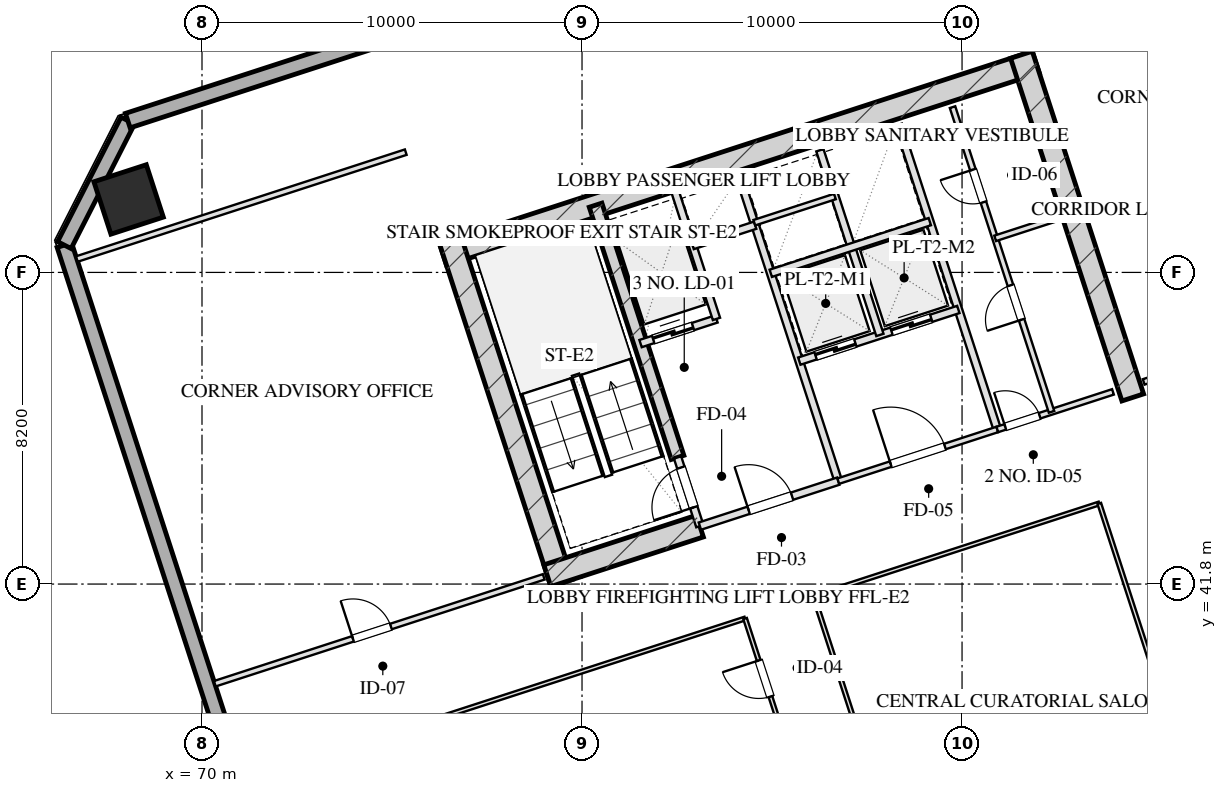
"""IFC4 building model, lengths in metres.
Left out: names, types, materials, properties, quantities, classifications, styles, units other than length and angle.
Written with IfcOpenShell. Run it as: python <this file> out.ifc"""

import sys

from ifc_helpers import new_model, si_unit, direction, frame, frame_2d, origin, origin_2d, place, context, subcontext, project, spatial, rectangle, hollow_rectangle, extrude, element, fill, save


model = new_model("IFC4")
c1 = context("Model", 3, precision=1e-05, world=origin(), true_north=direction((0.0, 1.0)))
c2 = subcontext(c1, "Body", "Model", "MODEL_VIEW")
j1 = project(units=[si_unit("LENGTHUNIT", "METRE"), si_unit("PLANEANGLEUNIT", "RADIAN")], contexts=[c1])
p1 = place(None, origin())
s1 = spatial("IfcSite", under=j1, at=p1, CompositionType="ELEMENT")
p2 = place(p1, origin())
s2 = spatial("IfcBuilding", under=s1, at=p2, CompositionType="ELEMENT")
p3 = place(p2, frame((0.0, 0.0, 113.85)))
s3 = spatial("IfcBuildingStorey", under=s2, at=p3, CompositionType="ELEMENT", Elevation=113.85)
p4 = place(p3, frame((76.344, 50.466, 0.0), z_axis=(0.0, 0.0, 1.0), x_axis=(0.951055727519, 0.309019421968, 0.0)))
e1 = element("IfcWall", 1, at=p4, inside=s3, PredefinedType="SHEAR", context=c2, shape_type="SweptSolid", body=[
    extrude(rectangle(XDim=16.4, YDim=0.6, at=frame_2d((8.2, 0.0))), origin(), (0.0, 0.0, 1.0), 3.45),
])
for number, where, z_axis, x_axis in (
    (2, (79.466, 41.828, 0.0), (0.0, 0.0, 1.0), (-0.309, 0.951, 0.0)),
    (3, (94.492, 46.71, 0.0), (0.0, 0.0, 1.0), (-0.309, 0.951, 0.0)),
):
    element("IfcWall", number, at=place(p3, frame(where, z_axis=z_axis, x_axis=x_axis)), inside=s3, PredefinedType="SHEAR", context=c2, shape_type="SweptSolid", body=[
        extrude(rectangle(XDim=9.48, YDim=0.6, at=frame_2d((4.74, 0.0))), origin(), (0.0, 0.0, 1.0), 3.45),
    ])
p5 = place(p3, frame((82.514, 45.131, 0.0), z_axis=(0.0, 0.0, 1.0), x_axis=(-0.308988790936, 0.951065679686, 0.0)))
e4 = element("IfcWall", 4, at=p5, inside=s3, PredefinedType="SHEAR", context=c2, shape_type="SweptSolid", body=[
    extrude(rectangle(XDim=6.98, YDim=0.35, at=frame_2d((3.49, 0.0))), origin(), (0.0, 0.0, 1.0), 3.45),
])
p6 = place(p3, frame((79.087, 42.021, 0.0), z_axis=(0.0, 0.0, 1.0), x_axis=(0.951062550203, 0.3089984233, 0.0)))
e5 = element("IfcWall", 5, at=p6, inside=s3, PredefinedType="SHEAR", context=c2, shape_type="SweptSolid", body=[
    extrude(rectangle(XDim=4.22, YDim=0.6, at=frame_2d((2.11, 0.0))), origin(), (0.0, 0.0, 1.0), 3.45),
])
p7 = place(p3, frame((68.069, 51.92, 0.0), z_axis=(0.0, 0.0, 1.0), x_axis=(0.951056516295, 0.309016994375, 0.0)))
e6 = element("IfcColumn", 6, at=p7, inside=s3, PredefinedType="COLUMN", context=c2, shape_type="SweptSolid", body=[
    extrude(hollow_rectangle(XDim=1.45, YDim=1.45, WallThickness=0.05, at=origin_2d()), origin(), (0.0, 0.0, 1.0), 3.451),
])
p8 = place(p3, frame((80.716, 6.59, 0.0), z_axis=(0.0, 0.0, 1.0), x_axis=(-0.309017542002, 0.95105633836, 0.0)))
e7 = element("IfcWall", 7, at=p8, inside=s3, PredefinedType="SOLIDWALL", context=c2, shape_type="SweptSolid", body=[
    extrude(rectangle(XDim=46.4, YDim=0.4, at=frame_2d((23.2, 0.0))), origin(), (0.0, 0.0, 1.0), 2.61),
])
p9 = place(p8, frame((25.25, 0.0, 0.0)))
e8 = element("IfcOpeningElement", 8, at=p9, cuts=e7, PredefinedType="OPENING", context=c2, shape_type="SweptSolid", body=[
    extrude(rectangle(XDim=1.1, YDim=2.15, at=frame_2d((0.55, 1.075))), frame((0.0, 0.21, 0.0), z_axis=(0.0, -1.0, 0.0), x_axis=(1.0, 0.0, 0.0)), (0.0, 0.0, 1.0), 0.42),
])
p10 = place(p3, frame((66.377, 50.719, 0.0), z_axis=(0.0, 0.0, 1.0), x_axis=(0.454026238093, 0.890988313685, 0.0)))
e9 = element("IfcWall", 9, at=p10, inside=s3, PredefinedType="SOLIDWALL", context=c2, shape_type="SweptSolid", body=[
    extrude(rectangle(XDim=3.677, YDim=0.4, at=frame_2d((1.838, 0.0))), origin(), (0.0, 0.0, 1.0), 2.61),
])
p11 = place(p3, frame((68.047, 53.995, 0.0), z_axis=(0.0, 0.0, 1.0), x_axis=(0.95105505922, 0.309021478754, 0.0)))
e10 = element("IfcWall", 10, at=p11, inside=s3, PredefinedType="SOLIDWALL", context=c2, shape_type="SweptSolid", body=[
    extrude(rectangle(XDim=29.4, YDim=0.4, at=frame_2d((14.7, 0.0))), origin(), (0.0, 0.0, 1.0), 2.61),
])
p12 = place(p3, frame((83.101, 43.324, 0.0), z_axis=(0.0, 0.0, 1.0), x_axis=(-0.309048298632, 0.951046344356, 0.0)))
e11 = element("IfcWall", 11, at=p12, inside=s3, PredefinedType="PARTITIONING", context=c2, shape_type="SweptSolid", body=[
    extrude(rectangle(XDim=1.9, YDim=0.2, at=frame_2d((0.95, 0.0))), origin(), (0.0, 0.0, 1.0), 3.175),
])
p13 = place(p12, frame((0.52, 0.0, 0.0)))
e12 = element("IfcOpeningElement", 12, at=p13, cuts=e11, PredefinedType="OPENING", context=c2, shape_type="SweptSolid", body=[
    extrude(rectangle(XDim=1.1, YDim=2.05, at=frame_2d((0.55, 1.025))), frame((0.0, 0.11, 0.0), z_axis=(0.0, -1.0, 0.0), x_axis=(1.0, 0.0, 0.0)), (0.0, 0.0, 1.0), 0.22),
])
p14 = place(p3, frame((86.743, 44.508, 0.0), z_axis=(0.0, 0.0, 1.0), x_axis=(-0.309016001439, 0.951056838919, 0.0)))
e13 = element("IfcWall", 13, at=p14, inside=s3, PredefinedType="PARTITIONING", context=c2, shape_type="SweptSolid", body=[
    extrude(rectangle(XDim=8.43, YDim=0.2, at=frame_2d((4.215, 0.0))), origin(), (0.0, 0.0, 1.0), 3.175),
])
p15 = place(p3, frame((83.101, 43.324, 0.0), z_axis=(0.0, 0.0, 1.0), x_axis=(0.951052804469, 0.309028417967, 0.0)))
e14 = element("IfcWall", 14, at=p15, inside=s3, PredefinedType="PARTITIONING", context=c2, shape_type="SweptSolid", body=[
    extrude(rectangle(XDim=3.83, YDim=0.2, at=frame_2d((1.915, 0.0))), origin(), (0.0, 0.0, 1.0), 3.175),
])
p16 = place(p15, frame((1.35, 0.0, 0.0)))
e15 = element("IfcOpeningElement", 15, at=p16, cuts=e14, PredefinedType="OPENING", context=c2, shape_type="SweptSolid", body=[
    extrude(rectangle(XDim=1.2, YDim=2.05, at=frame_2d((0.6, 1.025))), frame((0.0, 0.11, 0.0), z_axis=(0.0, -1.0, 0.0), x_axis=(1.0, 0.0, 0.0)), (0.0, 0.0, 1.0), 0.22),
])
p17 = place(p3, frame((81.54, 48.127, 0.0), z_axis=(0.0, 0.0, 1.0), x_axis=(0.951062257173, 0.308999325213, 0.0)))
e16 = element("IfcWall", 16, at=p17, inside=s3, PredefinedType="PARTITIONING", context=c2, shape_type="SweptSolid", body=[
    extrude(rectangle(XDim=2.1, YDim=0.2, at=frame_2d((1.05, 0.0))), origin(), (0.0, 0.0, 1.0), 3.175),
])
p18 = place(p17, frame((0.35, 0.0, 0.0)))
e17 = element("IfcOpeningElement", 17, at=p18, cuts=e16, PredefinedType="OPENING", context=c2, shape_type="SweptSolid", body=[
    extrude(rectangle(XDim=1.1, YDim=2.05, at=frame_2d((0.55, 1.025))), frame((0.0, 0.11, 0.0), z_axis=(0.0, -1.0, 0.0), x_axis=(1.0, 0.0, 0.0)), (0.0, 0.0, 1.0), 0.22),
])
p19 = place(p3, frame((83.538, 48.776, 0.0), z_axis=(0.0, 0.0, 1.0), x_axis=(-0.3089935693, 0.951064127245, 0.0)))
e18 = element("IfcWall", 18, at=p19, inside=s3, PredefinedType="PARTITIONING", context=c2, shape_type="SweptSolid", body=[
    extrude(rectangle(XDim=3.7, YDim=0.2, at=frame_2d((1.85, 0.0))), origin(), (0.0, 0.0, 1.0), 3.175),
])
p20 = place(p3, frame((82.91, 50.707, 0.0), z_axis=(0.0, 0.0, 1.0), x_axis=(0.951041328149, 0.309063734775, 0.0)))
e19 = element("IfcWall", 19, at=p20, inside=s3, PredefinedType="PARTITIONING", context=c2, shape_type="SweptSolid", body=[
    extrude(rectangle(XDim=1.73, YDim=0.2, at=frame_2d((0.865, 0.0))), origin(), (0.0, 0.0, 1.0), 3.175),
])
p21 = place(p3, frame((90.928, 45.868, 0.0), z_axis=(0.0, 0.0, 1.0), x_axis=(-0.309042196757, 0.951048327176, 0.0)))
e20 = element("IfcWall", 20, at=p21, inside=s3, PredefinedType="PARTITIONING", context=c2, shape_type="SweptSolid", body=[
    extrude(rectangle(XDim=8.43, YDim=0.2, at=frame_2d((4.215, 0.0))), origin(), (0.0, 0.0, 1.0), 3.175),
])
p22 = place(p3, frame((86.743, 44.508, 0.0), z_axis=(0.0, 0.0, 1.0), x_axis=(0.951063829732, 0.308994485023, 0.0)))
e21 = element("IfcWall", 21, at=p22, inside=s3, PredefinedType="PARTITIONING", context=c2, shape_type="SweptSolid", body=[
    extrude(rectangle(XDim=4.4, YDim=0.15, at=frame_2d((2.2, 0.0))), origin(), (0.0, 0.0, 1.0), 3.175),
])
p23 = place(p22, frame((1.45, 0.0, 0.0)))
e22 = element("IfcOpeningElement", 22, at=p23, cuts=e21, PredefinedType="OPENING", context=c2, shape_type="SweptSolid", body=[
    extrude(rectangle(XDim=1.5, YDim=2.05, at=frame_2d((0.75, 1.025))), frame((0.0, 0.085, 0.0), z_axis=(0.0, -1.0, 0.0), x_axis=(1.0, 0.0, 0.0)), (0.0, 0.0, 1.0), 0.17),
])
p24 = place(p3, frame((85.718, 47.666, 0.0), z_axis=(0.0, 0.0, 1.0), x_axis=(0.951058531764, 0.30901079133, 0.0)))
e23 = element("IfcWall", 23, at=p24, inside=s3, PredefinedType="PARTITIONING", context=c2, shape_type="SweptSolid", body=[
    extrude(rectangle(XDim=4.4, YDim=0.2, at=frame_2d((2.2, 0.0))), origin(), (0.0, 0.0, 1.0), 3.175),
])
p25 = place(p24, frame((0.45, 0.0, 0.0)))
e24 = element("IfcOpeningElement", 24, at=p25, cuts=e23, PredefinedType="OPENING", context=c2, shape_type="SweptSolid", body=[
    extrude(rectangle(XDim=1.1, YDim=2.05, at=frame_2d((0.55, 1.025))), frame((0.0, 0.11, 0.0), z_axis=(0.0, -1.0, 0.0), x_axis=(1.0, 0.0, 0.0)), (0.0, 0.0, 1.0), 0.22),
])
p26 = place(p24, frame((2.55, 0.0, 0.0)))
e25 = element("IfcOpeningElement", 25, at=p26, cuts=e23, PredefinedType="OPENING", context=c2, shape_type="SweptSolid", body=[
    extrude(rectangle(XDim=1.1, YDim=2.05, at=frame_2d((0.55, 1.025))), frame((0.0, 0.11, 0.0), z_axis=(0.0, -1.0, 0.0), x_axis=(1.0, 0.0, 0.0)), (0.0, 0.0, 1.0), 0.22),
])
p27 = place(p3, frame((87.838, 48.354, 0.0), z_axis=(0.0, 0.0, 1.0), x_axis=(-0.3090093719, 0.951058992953, 0.0)))
e26 = element("IfcWall", 26, at=p27, inside=s3, PredefinedType="PARTITIONING", context=c2, shape_type="SweptSolid", body=[
    extrude(rectangle(XDim=5.11, YDim=0.2, at=frame_2d((2.555, 0.0))), origin(), (0.0, 0.0, 1.0), 3.175),
])
p28 = place(p3, frame((84.967, 49.977, 0.0), z_axis=(0.0, 0.0, 1.0), x_axis=(0.951063829732, 0.308994485023, 0.0)))
e27 = element("IfcWall", 27, at=p28, inside=s3, PredefinedType="PARTITIONING", context=c2, shape_type="SweptSolid", body=[
    extrude(rectangle(XDim=4.4, YDim=0.2, at=frame_2d((2.2, 0.0))), origin(), (0.0, 0.0, 1.0), 3.175),
])
p29 = place(p3, frame((84.534, 51.308, 0.0), z_axis=(0.0, 0.0, 1.0), x_axis=(0.951075093106, 0.308959814982, 0.0)))
e28 = element("IfcWall", 28, at=p29, inside=s3, PredefinedType="PARTITIONING", context=c2, shape_type="SweptSolid", body=[
    extrude(rectangle(XDim=2.23, YDim=0.15, at=frame_2d((1.115, 0.0))), origin(), (0.0, 0.0, 1.0), 3.175),
])
p30 = place(p3, frame((90.928, 45.868, 0.0), z_axis=(0.0, 0.0, 1.0), x_axis=(0.951059297078, 0.309008435874, 0.0)))
e29 = element("IfcWall", 29, at=p30, inside=s3, PredefinedType="PARTITIONING", context=c2, shape_type="SweptSolid", body=[
    extrude(rectangle(XDim=3.2, YDim=0.15, at=frame_2d((1.6, 0.0))), origin(), (0.0, 0.0, 1.0), 3.175),
])
p31 = place(p30, frame((0.22, 0.0, 0.0)))
e30 = element("IfcOpeningElement", 30, at=p31, cuts=e29, PredefinedType="OPENING", context=c2, shape_type="SweptSolid", body=[
    extrude(rectangle(XDim=0.95, YDim=2.05, at=frame_2d((0.475, 1.025))), frame((0.0, 0.085, 0.0), z_axis=(0.0, -1.0, 0.0), x_axis=(1.0, 0.0, 0.0)), (0.0, 0.0, 1.0), 0.17),
])
p32 = place(p3, frame((92.355, 46.331, 0.0), z_axis=(0.0, 0.0, 1.0), x_axis=(-0.309007490203, 0.951059604335, 0.0)))
e31 = element("IfcWall", 31, at=p32, inside=s3, PredefinedType="PARTITIONING", context=c2, shape_type="SweptSolid", body=[
    extrude(rectangle(XDim=8.43, YDim=0.15, at=frame_2d((4.215, 0.0))), origin(), (0.0, 0.0, 1.0), 3.175),
])
p33 = place(p32, frame((2.55, 0.0, 0.0)))
e32 = element("IfcOpeningElement", 32, at=p33, cuts=e31, PredefinedType="OPENING", context=c2, shape_type="SweptSolid", body=[
    extrude(rectangle(XDim=0.95, YDim=2.05, at=frame_2d((0.475, 1.025))), frame((0.0, 0.085, 0.0), z_axis=(0.0, -1.0, 0.0), x_axis=(1.0, 0.0, 0.0)), (0.0, 0.0, 1.0), 0.17),
])
p34 = place(p32, frame((5.8, 0.0, 0.0)))
e33 = element("IfcOpeningElement", 33, at=p34, cuts=e31, PredefinedType="OPENING", context=c2, shape_type="SweptSolid", body=[
    extrude(rectangle(XDim=0.9, YDim=2.05, at=frame_2d((0.45, 1.025))), frame((0.0, 0.085, 0.0), z_axis=(0.0, -1.0, 0.0), x_axis=(1.0, 0.0, 0.0)), (0.0, 0.0, 1.0), 0.17),
])
p35 = place(p3, frame((90.871, 50.896, 0.0), z_axis=(0.0, 0.0, 1.0), x_axis=(0.951054116971, 0.309024378638, 0.0)))
e34 = element("IfcWall", 34, at=p35, inside=s3, PredefinedType="PARTITIONING", context=c2, shape_type="SweptSolid", body=[
    extrude(rectangle(XDim=1.7, YDim=0.15, at=frame_2d((0.85, 0.0))), origin(), (0.0, 0.0, 1.0), 3.175),
])
p36 = place(p3, frame((66.707, 50.352, 0.0), z_axis=(0.0, 0.0, 1.0), x_axis=(0.951057133767, 0.309015093986, 0.0)))
e35 = element("IfcWall", 35, at=p36, inside=s3, PredefinedType="PARTITIONING", context=c2, shape_type="SweptSolid", body=[
    extrude(rectangle(XDim=9.1, YDim=0.15, at=frame_2d((4.55, 0.0))), origin(), (0.0, 0.0, 1.0), 3.175),
])
p37 = place(p3, frame((70.338, 39.177, 0.0), z_axis=(0.0, 0.0, 1.0), x_axis=(0.951059695568, 0.309007209409, 0.0)))
e36 = element("IfcWall", 36, at=p37, inside=s3, PredefinedType="PARTITIONING", context=c2, shape_type="SweptSolid", body=[
    extrude(rectangle(XDim=9.1, YDim=0.15, at=frame_2d((4.55, 0.0))), origin(), (0.0, 0.0, 1.0), 3.175),
])
p38 = place(p37, frame((3.822, 0.0, 0.0)))
e37 = element("IfcOpeningElement", 37, at=p38, cuts=e36, PredefinedType="OPENING", context=c2, shape_type="SweptSolid", body=[
    extrude(rectangle(XDim=1.05, YDim=2.05, at=frame_2d((0.525, 1.025))), frame((0.0, 0.085, 0.0), z_axis=(0.0, -1.0, 0.0), x_axis=(1.0, 0.0, 0.0)), (0.0, 0.0, 1.0), 0.17),
])
p39 = place(p3, frame((94.78, 47.119, 0.0), z_axis=(0.0, 0.0, 1.0), x_axis=(0.951054329824, 0.309023723562, 0.0)))
e38 = element("IfcWall", 38, at=p39, inside=s3, PredefinedType="PARTITIONING", context=c2, shape_type="SweptSolid", body=[
    extrude(rectangle(XDim=8.5, YDim=0.15, at=frame_2d((4.25, 0.0))), origin(), (0.0, 0.0, 1.0), 3.175),
])
p40 = place(p39, frame((3.57, 0.0, 0.0)))
e39 = element("IfcOpeningElement", 39, at=p40, cuts=e38, PredefinedType="OPENING", context=c2, shape_type="SweptSolid", body=[
    extrude(rectangle(XDim=0.85, YDim=2.05, at=frame_2d((0.425, 1.025))), frame((0.0, 0.085, 0.0), z_axis=(0.0, -1.0, 0.0), x_axis=(1.0, 0.0, 0.0)), (0.0, 0.0, 1.0), 0.17),
])
p41 = place(p3, frame((71.166, 36.629, 0.0), z_axis=(0.0, 0.0, 1.0), x_axis=(0.951056688031, 0.309016465825, 0.0)))
e40 = element("IfcWall", 40, at=p41, inside=s3, PredefinedType="MOVABLE", context=c2, shape_type="SweptSolid", body=[
    extrude(rectangle(XDim=13.8, YDim=0.1, at=frame_2d((6.9, 0.0))), origin(), (0.0, 0.0, 1.0), 3.175),
])
p42 = place(p3, frame((86.097, 41.48, 0.0), z_axis=(0.0, 0.0, 1.0), x_axis=(0.951060182336, 0.309005711233, 0.0)))
e41 = element("IfcWall", 41, at=p42, inside=s3, PredefinedType="MOVABLE", context=c2, shape_type="SweptSolid", body=[
    extrude(rectangle(XDim=7.9, YDim=0.1, at=frame_2d((3.95, 0.0))), origin(), (0.0, 0.0, 1.0), 3.175),
])
p43 = place(p3, frame((89.433, 25.067, 0.0), z_axis=(0.0, 0.0, 1.0), x_axis=(-0.30901773025, 0.951056277195, 0.0)))
e42 = element("IfcWall", 42, at=p43, inside=s3, PredefinedType="MOVABLE", context=c2, shape_type="SweptSolid", body=[
    extrude(rectangle(XDim=16.64, YDim=0.1, at=frame_2d((8.32, 0.0))), origin(), (0.0, 0.0, 1.0), 3.175),
])
p44 = place(p43, frame((1.16, 0.0, 0.0)))
e43 = element("IfcOpeningElement", 43, at=p44, cuts=e42, PredefinedType="OPENING", context=c2, shape_type="SweptSolid", body=[
    extrude(rectangle(XDim=1.0, YDim=2.05, at=frame_2d((0.5, 1.025))), frame((0.0, 0.06, 0.0), z_axis=(0.0, -1.0, 0.0), x_axis=(1.0, 0.0, 0.0)), (0.0, 0.0, 1.0), 0.12),
])
p45 = place(p43, frame((6.16, 0.0, 0.0)))
e44 = element("IfcOpeningElement", 44, at=p45, cuts=e42, PredefinedType="OPENING", context=c2, shape_type="SweptSolid", body=[
    extrude(rectangle(XDim=1.0, YDim=2.05, at=frame_2d((0.5, 1.025))), frame((0.0, 0.06, 0.0), z_axis=(0.0, -1.0, 0.0), x_axis=(1.0, 0.0, 0.0)), (0.0, 0.0, 1.0), 0.12),
])
p46 = place(p43, frame((10.16, 0.0, 0.0)))
e45 = element("IfcOpeningElement", 45, at=p46, cuts=e42, PredefinedType="OPENING", context=c2, shape_type="SweptSolid", body=[
    extrude(rectangle(XDim=1.0, YDim=2.05, at=frame_2d((0.5, 1.025))), frame((0.0, 0.06, 0.0), z_axis=(0.0, -1.0, 0.0), x_axis=(1.0, 0.0, 0.0)), (0.0, 0.0, 1.0), 0.12),
])
p47 = place(p43, frame((14.48, 0.0, 0.0)))
e46 = element("IfcOpeningElement", 46, at=p47, cuts=e42, PredefinedType="OPENING", context=c2, shape_type="SweptSolid", body=[
    extrude(rectangle(XDim=1.0, YDim=2.05, at=frame_2d((0.5, 1.025))), frame((0.0, 0.06, 0.0), z_axis=(0.0, -1.0, 0.0), x_axis=(1.0, 0.0, 0.0)), (0.0, 0.0, 1.0), 0.12),
])
p48 = place(p3, frame((91.24, 25.655, 0.0), z_axis=(0.0, 0.0, 1.0), x_axis=(-0.30901773025, 0.951056277195, 0.0)))
e47 = element("IfcWall", 47, at=p48, inside=s3, PredefinedType="MOVABLE", context=c2, shape_type="SweptSolid", body=[
    extrude(rectangle(XDim=16.64, YDim=0.1, at=frame_2d((8.32, 0.0))), origin(), (0.0, 0.0, 1.0), 3.175),
])
p49 = place(p48, frame((3.204, 0.0, 0.0)))
e48 = element("IfcOpeningElement", 48, at=p49, cuts=e47, PredefinedType="OPENING", context=c2, shape_type="SweptSolid", body=[
    extrude(rectangle(XDim=1.1, YDim=2.05, at=frame_2d((0.55, 1.025))), frame((0.0, 0.06, 0.0), z_axis=(0.0, -1.0, 0.0), x_axis=(1.0, 0.0, 0.0)), (0.0, 0.0, 1.0), 0.12),
])
p50 = place(p48, frame((11.404, 0.0, 0.0)))
e49 = element("IfcOpeningElement", 49, at=p50, cuts=e47, PredefinedType="OPENING", context=c2, shape_type="SweptSolid", body=[
    extrude(rectangle(XDim=1.1, YDim=2.05, at=frame_2d((0.55, 1.025))), frame((0.0, 0.06, 0.0), z_axis=(0.0, -1.0, 0.0), x_axis=(1.0, 0.0, 0.0)), (0.0, 0.0, 1.0), 0.12),
])
p51 = place(p3, frame((98.753, 28.096, 0.0), z_axis=(0.0, 0.0, 1.0), x_axis=(-0.30901773025, 0.951056277195, 0.0)))
e50 = element("IfcWall", 50, at=p51, inside=s3, PredefinedType="MOVABLE", context=c2, shape_type="SweptSolid", body=[
    extrude(rectangle(XDim=16.64, YDim=0.1, at=frame_2d((8.32, 0.0))), origin(), (0.0, 0.0, 1.0), 3.175),
])
p52 = place(p13, origin())
e51 = element("IfcDoor", 51, at=p52, inside=s3, OperationType="SINGLE_SWING_LEFT", PredefinedType="DOOR", context=c2, shape_type="SweptSolid", body=[
    extrude(rectangle(XDim=1.1, YDim=2.05, at=frame_2d((0.55, 1.025))), frame((0.0, 0.025, 0.0), z_axis=(0.0, -1.0, 0.0), x_axis=(1.0, 0.0, 0.0)), (0.0, 0.0, 1.0), 0.05),
])
fill(e12, e51)
p53 = place(p16, origin())
e52 = element("IfcDoor", 52, at=p53, inside=s3, OperationType="SINGLE_SWING_LEFT", PredefinedType="DOOR", context=c2, shape_type="SweptSolid", body=[
    extrude(rectangle(XDim=1.2, YDim=2.05, at=frame_2d((0.6, 1.025))), frame((0.0, 0.025, 0.0), z_axis=(0.0, -1.0, 0.0), x_axis=(1.0, 0.0, 0.0)), (0.0, 0.0, 1.0), 0.05),
])
fill(e15, e52)
p54 = place(p18, origin())
e53 = element("IfcDoor", 53, at=p54, inside=s3, OperationType="DOUBLE_DOOR_SLIDING", PredefinedType="DOOR", context=c2, shape_type="SweptSolid", body=[
    extrude(rectangle(XDim=1.1, YDim=2.05, at=frame_2d((0.55, 1.025))), frame((0.0, 0.025, 0.0), z_axis=(0.0, -1.0, 0.0), x_axis=(1.0, 0.0, 0.0)), (0.0, 0.0, 1.0), 0.05),
])
fill(e17, e53)
p55 = place(p23, origin())
e54 = element("IfcDoor", 54, at=p55, inside=s3, OperationType="SINGLE_SWING_LEFT", PredefinedType="DOOR", context=c2, shape_type="SweptSolid", body=[
    extrude(rectangle(XDim=1.5, YDim=2.05, at=frame_2d((0.75, 1.025))), frame((0.0, 0.025, 0.0), z_axis=(0.0, -1.0, 0.0), x_axis=(1.0, 0.0, 0.0)), (0.0, 0.0, 1.0), 0.05),
])
fill(e22, e54)
p56 = place(p25, origin())
e55 = element("IfcDoor", 55, at=p56, inside=s3, OperationType="DOUBLE_DOOR_SLIDING", PredefinedType="DOOR", context=c2, shape_type="SweptSolid", body=[
    extrude(rectangle(XDim=1.1, YDim=2.05, at=frame_2d((0.55, 1.025))), frame((0.0, 0.025, 0.0), z_axis=(0.0, -1.0, 0.0), x_axis=(1.0, 0.0, 0.0)), (0.0, 0.0, 1.0), 0.05),
])
fill(e24, e55)
p57 = place(p26, origin())
e56 = element("IfcDoor", 56, at=p57, inside=s3, OperationType="DOUBLE_DOOR_SLIDING", PredefinedType="DOOR", context=c2, shape_type="SweptSolid", body=[
    extrude(rectangle(XDim=1.1, YDim=2.05, at=frame_2d((0.55, 1.025))), frame((0.0, 0.025, 0.0), z_axis=(0.0, -1.0, 0.0), x_axis=(1.0, 0.0, 0.0)), (0.0, 0.0, 1.0), 0.05),
])
fill(e25, e56)
p58 = place(p31, origin())
e57 = element("IfcDoor", 57, at=p58, inside=s3, OperationType="SINGLE_SWING_LEFT", PredefinedType="DOOR", context=c2, shape_type="SweptSolid", body=[
    extrude(rectangle(XDim=0.95, YDim=2.05, at=frame_2d((0.475, 1.025))), frame((0.0, 0.025, 0.0), z_axis=(0.0, -1.0, 0.0), x_axis=(1.0, 0.0, 0.0)), (0.0, 0.0, 1.0), 0.05),
])
fill(e30, e57)
p59 = place(p33, origin())
e58 = element("IfcDoor", 58, at=p59, inside=s3, OperationType="SINGLE_SWING_LEFT", PredefinedType="DOOR", context=c2, shape_type="SweptSolid", body=[
    extrude(rectangle(XDim=0.95, YDim=2.05, at=frame_2d((0.475, 1.025))), frame((0.0, 0.025, 0.0), z_axis=(0.0, -1.0, 0.0), x_axis=(1.0, 0.0, 0.0)), (0.0, 0.0, 1.0), 0.05),
])
fill(e32, e58)
p60 = place(p34, origin())
e59 = element("IfcDoor", 59, at=p60, inside=s3, OperationType="SINGLE_SWING_RIGHT", PredefinedType="DOOR", context=c2, shape_type="SweptSolid", body=[
    extrude(rectangle(XDim=0.9, YDim=2.05, at=frame_2d((0.45, 1.025))), frame((0.0, 0.025, 0.0), z_axis=(0.0, -1.0, 0.0), x_axis=(1.0, 0.0, 0.0)), (0.0, 0.0, 1.0), 0.05),
])
fill(e33, e59)
p61 = place(p38, origin())
e60 = element("IfcDoor", 60, at=p61, inside=s3, OperationType="SINGLE_SWING_LEFT", PredefinedType="DOOR", context=c2, shape_type="SweptSolid", body=[
    extrude(rectangle(XDim=1.05, YDim=2.05, at=frame_2d((0.525, 1.025))), frame((0.0, 0.025, 0.0), z_axis=(0.0, -1.0, 0.0), x_axis=(1.0, 0.0, 0.0)), (0.0, 0.0, 1.0), 0.05),
])
fill(e37, e60)
p62 = place(p47, origin())
e61 = element("IfcDoor", 61, at=p62, inside=s3, OperationType="SINGLE_SWING_RIGHT", PredefinedType="DOOR", context=c2, shape_type="SweptSolid", body=[
    extrude(rectangle(XDim=1.0, YDim=2.05, at=frame_2d((0.5, 1.025))), frame((0.0, 0.025, 0.0), z_axis=(0.0, -1.0, 0.0), x_axis=(1.0, 0.0, 0.0)), (0.0, 0.0, 1.0), 0.05),
])
fill(e46, e61)
save(model, sys.argv[1])
